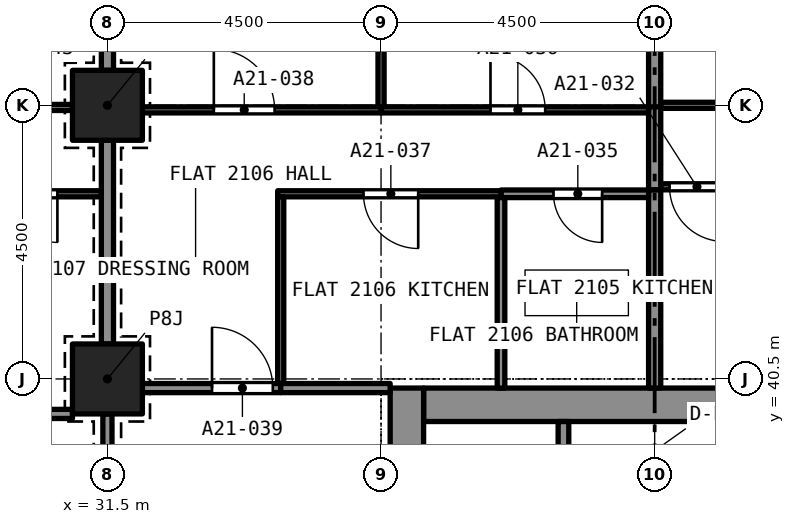
"""IFC4 building model, lengths in metres.
Left out: names, types, materials, properties, quantities, classifications, styles, units other than length and angle.
Written with IfcOpenShell. Run it as: python <this file> out.ifc"""

import sys

from ifc_helpers import new_model, si_unit, direction, frame, frame_2d, origin, origin_2d, place, context, subcontext, project, spatial, rectangle, extrude, element, fill, save


model = new_model("IFC4")
c1 = context("Model", 3, precision=1e-05, world=origin(), true_north=direction((0.0, 1.0)))
c2 = subcontext(c1, "Body", "Model", "MODEL_VIEW")
j1 = project(units=[si_unit("LENGTHUNIT", "METRE"), si_unit("PLANEANGLEUNIT", "RADIAN")], contexts=[c1])
p1 = place(None, origin())
s1 = spatial("IfcSite", under=j1, at=p1, CompositionType="ELEMENT")
p2 = place(p1, origin())
s2 = spatial("IfcBuilding", under=s1, at=p2, CompositionType="ELEMENT")
p3 = place(p2, frame((0.0, 0.0, 80.0)))
s3 = spatial("IfcBuildingStorey", under=s2, at=p3, CompositionType="ELEMENT", Elevation=80.0)
for number, where, z_axis, x_axis in (
    (1, (31.5, 40.5, 0.0), (0.0, 0.0, 1.0), (1.0, 0.0, 0.0)),
    (2, (31.5, 45.0, 0.0), (0.0, 0.0, 1.0), (1.0, 0.0, 0.0)),
):
    element("IfcColumn", number, at=place(p3, frame(where, z_axis=z_axis, x_axis=x_axis)), inside=s3, PredefinedType="COLUMN", context=c2, shape_type="SweptSolid", body=[
        extrude(rectangle(XDim=1.15, YDim=1.15, at=origin_2d()), origin(), (0.0, 0.0, 1.0), 3.2),
    ])
p4 = place(p3, frame((36.7, 40.075, 0.0), z_axis=(0.0, 0.0, 1.0), x_axis=(1.0, 0.0, 0.0)))
e3 = element("IfcWall", 3, at=p4, inside=s3, PredefinedType="SOLIDWALL", context=c2, shape_type="SweptSolid", body=[
    extrude(rectangle(XDim=7.6, YDim=0.55, at=frame_2d((3.8, 0.0))), origin(), (0.0, 0.0, 1.0), 3.2),
])
p5 = place(p3, frame((36.425, 27.15, 0.0), z_axis=(0.0, 0.0, 1.0), x_axis=(0.0, 1.0, 0.0)))
e4 = element("IfcWall", 4, at=p5, inside=s3, PredefinedType="SOLIDWALL", context=c2, shape_type="SweptSolid", body=[
    extrude(rectangle(XDim=13.2, YDim=0.55, at=frame_2d((6.6, 0.0))), origin(), (0.0, 0.0, 1.0), 3.2),
])
p6 = place(p5, frame((8.8, 0.0, 0.0)))
e5 = element("IfcOpeningElement", 5, at=p6, cuts=e4, PredefinedType="OPENING", context=c2, shape_type="SweptSolid", body=[
    extrude(rectangle(XDim=1.2, YDim=2.1, at=frame_2d((0.6, 1.05))), frame((0.0, 0.285, 0.0), z_axis=(0.0, -1.0, 0.0), x_axis=(1.0, 0.0, 0.0)), (0.0, 0.0, 1.0), 0.57),
])
p7 = place(p3, frame((40.6, 45.0, 0.0), z_axis=(0.0, 0.0, 1.0), x_axis=(1.0, 0.0, 0.0)))
e6 = element("IfcWall", 6, at=p7, inside=s3, PredefinedType="PARTITIONING", context=c2, shape_type="SweptSolid", body=[
    extrude(rectangle(XDim=4.4, YDim=0.1, at=frame_2d((2.2, 0.0))), origin(), (0.0, 0.0, 1.0), 2.9),
])
p8 = place(p7, frame((1.7, 0.0, 0.0)))
e7 = element("IfcOpeningElement", 7, at=p8, cuts=e6, PredefinedType="OPENING", context=c2, shape_type="SweptSolid", body=[
    extrude(rectangle(XDim=0.9, YDim=2.1, at=frame_2d((0.45, 1.05))), frame((0.0, 0.06, 0.0), z_axis=(0.0, -1.0, 0.0), x_axis=(1.0, 0.0, 0.0)), (0.0, 0.0, 1.0), 0.12),
])
p9 = place(p3, frame((40.5, 44.95, 0.0), z_axis=(0.0, 0.0, 1.0), x_axis=(0.0, 1.0, 0.0)))
e8 = element("IfcWall", 8, at=p9, inside=s3, PredefinedType="PARTITIONING", context=c2, shape_type="SweptSolid", body=[
    extrude(rectangle(XDim=3.975, YDim=0.2, at=frame_2d((1.988, 0.0))), origin(), (0.0, 0.0, 1.0), 2.9),
])
p10 = place(p3, frame((41.891, 43.66, 0.0), z_axis=(0.0, 0.0, 1.0), x_axis=(-1.0, 0.0, 0.0)))
e9 = element("IfcWall", 9, at=p10, inside=s3, PredefinedType="PARTITIONING", context=c2, shape_type="SweptSolid", body=[
    extrude(rectangle(XDim=1.291, YDim=0.1, at=frame_2d((0.646, 0.0))), origin(), (0.0, 0.0, 1.0), 2.9),
])
p11 = place(p10, frame((0.246, 0.0, 0.0)))
e10 = element("IfcOpeningElement", 10, at=p11, cuts=e9, PredefinedType="OPENING", context=c2, shape_type="SweptSolid", body=[
    extrude(rectangle(XDim=0.9, YDim=2.1, at=frame_2d((0.45, 1.05))), frame((0.0, 0.06, 0.0), z_axis=(0.0, -1.0, 0.0), x_axis=(1.0, 0.0, 0.0)), (0.0, 0.0, 1.0), 0.12),
])
p12 = place(p3, frame((40.5, 43.61, 0.0), z_axis=(0.0, 0.0, 1.0), x_axis=(0.0, 1.0, 0.0)))
e11 = element("IfcWall", 11, at=p12, inside=s3, PredefinedType="PARTITIONING", context=c2, shape_type="SweptSolid", body=[
    extrude(rectangle(XDim=1.365, YDim=0.2, at=frame_2d((0.683, 0.0))), origin(), (0.0, 0.0, 1.0), 2.9),
])
p13 = place(p3, frame((40.5, 40.35, 0.0), z_axis=(0.0, 0.0, 1.0), x_axis=(0.0, 1.0, 0.0)))
e12 = element("IfcWall", 12, at=p13, inside=s3, PredefinedType="PARTITIONING", context=c2, shape_type="SweptSolid", body=[
    extrude(rectangle(XDim=3.257, YDim=0.2, at=frame_2d((1.629, 0.0))), origin(), (0.0, 0.0, 1.0), 2.9),
])
p14 = place(p3, frame((40.4, 43.545, 0.0), z_axis=(0.0, 0.0, 1.0), x_axis=(-1.0, 0.0, 0.0)))
e13 = element("IfcWall", 13, at=p14, inside=s3, PredefinedType="PARTITIONING", context=c2, shape_type="SweptSolid", body=[
    extrude(rectangle(XDim=2.427, YDim=0.125, at=frame_2d((1.214, 0.0))), origin(), (0.0, 0.0, 1.0), 2.9),
])
p15 = place(p14, frame((0.764, 0.0, 0.0)))
e14 = element("IfcOpeningElement", 14, at=p15, cuts=e13, PredefinedType="OPENING", context=c2, shape_type="SweptSolid", body=[
    extrude(rectangle(XDim=0.8, YDim=2.1, at=frame_2d((0.4, 1.05))), frame((0.0, 0.073, 0.0), z_axis=(0.0, -1.0, 0.0), x_axis=(1.0, 0.0, 0.0)), (0.0, 0.0, 1.0), 0.145),
])
p16 = place(p3, frame((37.973, 40.35, 0.0), z_axis=(0.0, 0.0, 1.0), x_axis=(0.0, 1.0, 0.0)))
e15 = element("IfcWall", 15, at=p16, inside=s3, PredefinedType="PARTITIONING", context=c2, shape_type="SweptSolid", body=[
    extrude(rectangle(XDim=3.132, YDim=0.125, at=frame_2d((1.566, 0.0))), origin(), (0.0, 0.0, 1.0), 2.9),
])
p17 = place(p3, frame((36.0, 44.925, 0.0), z_axis=(0.0, 0.0, 1.0), x_axis=(1.0, 0.0, 0.0)))
e16 = element("IfcWall", 16, at=p17, inside=s3, PredefinedType="PARTITIONING", context=c2, shape_type="SweptSolid", body=[
    extrude(rectangle(XDim=4.4, YDim=0.1, at=frame_2d((2.2, 0.0))), origin(), (0.0, 0.0, 1.0), 2.9),
])
p18 = place(p17, frame((1.8, 0.0, 0.0)))
e17 = element("IfcOpeningElement", 17, at=p18, cuts=e16, PredefinedType="OPENING", context=c2, shape_type="SweptSolid", body=[
    extrude(rectangle(XDim=0.9, YDim=2.1, at=frame_2d((0.45, 1.05))), frame((0.0, 0.06, 0.0), z_axis=(0.0, -1.0, 0.0), x_axis=(1.0, 0.0, 0.0)), (0.0, 0.0, 1.0), 0.12),
])
p19 = place(p3, frame((36.0, 44.975, 0.0), z_axis=(0.0, 0.0, 1.0), x_axis=(0.0, 1.0, 0.0)))
e18 = element("IfcWall", 18, at=p19, inside=s3, PredefinedType="PARTITIONING", context=c2, shape_type="SweptSolid", body=[
    extrude(rectangle(XDim=3.95, YDim=0.1, at=frame_2d((1.975, 0.0))), origin(), (0.0, 0.0, 1.0), 2.9),
])
p20 = place(p3, frame((37.973, 43.545, 0.0), z_axis=(0.0, 0.0, 1.0), x_axis=(-1.0, 0.0, 0.0)))
e19 = element("IfcWall", 19, at=p20, inside=s3, PredefinedType="PARTITIONING", context=c2, shape_type="SweptSolid", body=[
    extrude(rectangle(XDim=3.673, YDim=0.1, at=frame_2d((1.836, 0.0))), origin(), (0.0, 0.0, 1.0), 2.9),
])
p21 = place(p20, frame((1.361, 0.0, 0.0)))
e20 = element("IfcOpeningElement", 20, at=p21, cuts=e19, PredefinedType="OPENING", context=c2, shape_type="SweptSolid", body=[
    extrude(rectangle(XDim=0.9, YDim=2.1, at=frame_2d((0.45, 1.05))), frame((0.0, 0.06, 0.0), z_axis=(0.0, -1.0, 0.0), x_axis=(1.0, 0.0, 0.0)), (0.0, 0.0, 1.0), 0.12),
])
p22 = place(p3, frame((34.35, 40.425, 0.0), z_axis=(0.0, 0.0, 1.0), x_axis=(0.0, 1.0, 0.0)))
e21 = element("IfcWall", 21, at=p22, inside=s3, PredefinedType="PARTITIONING", context=c2, shape_type="SweptSolid", body=[
    extrude(rectangle(XDim=3.07, YDim=0.1, at=frame_2d((1.535, 0.0))), origin(), (0.0, 0.0, 1.0), 2.9),
])
p23 = place(p3, frame((32.075, 44.925, 0.0), z_axis=(0.0, 0.0, 1.0), x_axis=(1.0, 0.0, 0.0)))
e22 = element("IfcWall", 22, at=p23, inside=s3, PredefinedType="PARTITIONING", context=c2, shape_type="SweptSolid", body=[
    extrude(rectangle(XDim=3.925, YDim=0.1, at=frame_2d((1.962, 0.0))), origin(), (0.0, 0.0, 1.0), 2.9),
])
p24 = place(p23, frame((1.175, 0.0, 0.0)))
e23 = element("IfcOpeningElement", 23, at=p24, cuts=e22, PredefinedType="OPENING", context=c2, shape_type="SweptSolid", body=[
    extrude(rectangle(XDim=1.0, YDim=2.1, at=frame_2d((0.5, 1.05))), frame((0.0, 0.06, 0.0), z_axis=(0.0, -1.0, 0.0), x_axis=(1.0, 0.0, 0.0)), (0.0, 0.0, 1.0), 0.12),
])
p25 = place(p3, frame((31.5, 41.075, 0.0), z_axis=(0.0, 0.0, 1.0), x_axis=(0.0, 1.0, 0.0)))
e24 = element("IfcWall", 24, at=p25, inside=s3, PredefinedType="PARTITIONING", context=c2, shape_type="SweptSolid", body=[
    extrude(rectangle(XDim=3.35, YDim=0.2, at=frame_2d((1.675, 0.0))), origin(), (0.0, 0.0, 1.0), 2.38),
])
p26 = place(p3, frame((32.075, 40.35, 0.0), z_axis=(0.0, 0.0, 1.0), x_axis=(1.0, 0.0, 0.0)))
e25 = element("IfcWall", 25, at=p26, inside=s3, PredefinedType="PARTITIONING", context=c2, shape_type="SweptSolid", body=[
    extrude(rectangle(XDim=2.275, YDim=0.15, at=frame_2d((1.138, 0.0))), origin(), (0.0, 0.0, 1.0), 2.9),
])
p27 = place(p26, frame((1.145, 0.0, 0.0)))
e26 = element("IfcOpeningElement", 26, at=p27, cuts=e25, PredefinedType="OPENING", context=c2, shape_type="SweptSolid", body=[
    extrude(rectangle(XDim=1.0, YDim=2.1, at=frame_2d((0.5, 1.05))), frame((0.0, 0.085, 0.0), z_axis=(0.0, -1.0, 0.0), x_axis=(1.0, 0.0, 0.0)), (0.0, 0.0, 1.0), 0.17),
])
p28 = place(p3, frame((34.35, 40.35, 0.0), z_axis=(0.0, 0.0, 1.0), x_axis=(1.0, 0.0, 0.0)))
e27 = element("IfcWall", 27, at=p28, inside=s3, PredefinedType="PARTITIONING", context=c2, shape_type="SweptSolid", body=[
    extrude(rectangle(XDim=1.8, YDim=0.15, at=frame_2d((0.9, 0.0))), origin(), (0.0, 0.0, 1.0), 2.9),
])
p29 = place(p3, frame((31.5, 45.575, 0.0), z_axis=(0.0, 0.0, 1.0), x_axis=(0.0, 1.0, 0.0)))
e28 = element("IfcWall", 28, at=p29, inside=s3, PredefinedType="PARTITIONING", context=c2, shape_type="SweptSolid", body=[
    extrude(rectangle(XDim=3.35, YDim=0.2, at=frame_2d((1.675, 0.0))), origin(), (0.0, 0.0, 1.0), 2.38),
])
p30 = place(p3, frame((25.35, 39.925, 0.0), z_axis=(0.0, 0.0, 1.0), x_axis=(1.0, 0.0, 0.0)))
e29 = element("IfcWall", 29, at=p30, inside=s3, PredefinedType="PARTITIONING", context=c2, shape_type="SweptSolid", body=[
    extrude(rectangle(XDim=5.575, YDim=0.15, at=frame_2d((2.788, 0.0))), origin(), (0.0, 0.0, 1.0), 2.75),
])
p31 = place(p3, frame((27.0, 44.965, 0.0), z_axis=(0.0, 0.0, 1.0), x_axis=(1.0, 0.0, 0.0)))
e30 = element("IfcWall", 30, at=p31, inside=s3, PredefinedType="PARTITIONING", context=c2, shape_type="SweptSolid", body=[
    extrude(rectangle(XDim=3.925, YDim=0.1, at=frame_2d((1.962, 0.0))), origin(), (0.0, 0.0, 1.0), 2.75),
])
p32 = place(p31, frame((1.8, 0.0, 0.0)))
e31 = element("IfcOpeningElement", 31, at=p32, cuts=e30, PredefinedType="OPENING", context=c2, shape_type="SweptSolid", body=[
    extrude(rectangle(XDim=0.9, YDim=2.1, at=frame_2d((0.45, 1.05))), frame((0.0, 0.06, 0.0), z_axis=(0.0, -1.0, 0.0), x_axis=(1.0, 0.0, 0.0)), (0.0, 0.0, 1.0), 0.12),
])
p33 = place(p3, frame((31.4, 43.545, 0.0), z_axis=(0.0, 0.0, 1.0), x_axis=(-1.0, 0.0, 0.0)))
e32 = element("IfcWall", 32, at=p33, inside=s3, PredefinedType="PARTITIONING", context=c2, shape_type="SweptSolid", body=[
    extrude(rectangle(XDim=2.345, YDim=0.1, at=frame_2d((1.173, 0.0))), origin(), (0.0, 0.0, 1.0), 2.75),
])
p34 = place(p33, frame((0.723, 0.0, 0.0)))
e33 = element("IfcOpeningElement", 33, at=p34, cuts=e32, PredefinedType="OPENING", context=c2, shape_type="SweptSolid", body=[
    extrude(rectangle(XDim=0.8, YDim=2.1, at=frame_2d((0.4, 1.05))), frame((0.0, 0.06, 0.0), z_axis=(0.0, -1.0, 0.0), x_axis=(1.0, 0.0, 0.0)), (0.0, 0.0, 1.0), 0.12),
])
p35 = place(p3, frame((31.5, 36.575, 0.0), z_axis=(0.0, 0.0, 1.0), x_axis=(0.0, 1.0, 0.0)))
e34 = element("IfcWall", 34, at=p35, inside=s3, PredefinedType="PARTITIONING", context=c2, shape_type="SweptSolid", body=[
    extrude(rectangle(XDim=3.35, YDim=0.15, at=frame_2d((1.675, 0.0))), origin(), (0.0, 0.0, 1.0), 2.38),
])
p36 = place(p35, frame((1.075, 0.0, 0.0)))
e35 = element("IfcOpeningElement", 35, at=p36, cuts=e34, PredefinedType="OPENING", context=c2, shape_type="SweptSolid", body=[
    extrude(rectangle(XDim=1.2, YDim=2.1, at=frame_2d((0.6, 1.05))), frame((0.0, 0.085, 0.0), z_axis=(0.0, -1.0, 0.0), x_axis=(1.0, 0.0, 0.0)), (0.0, 0.0, 1.0), 0.17),
])
p37 = place(p3, frame((39.0, 37.5, 0.0), z_axis=(0.0, 0.0, 1.0), x_axis=(0.0, 1.0, 0.0)))
e36 = element("IfcWall", 36, at=p37, inside=s3, PredefinedType="SOLIDWALL", context=c2, shape_type="SweptSolid", body=[
    extrude(rectangle(XDim=2.3, YDim=0.175, at=frame_2d((1.15, 0.0))), origin(), (0.0, 0.0, 1.0), 2.9),
])
p38 = place(p11, origin())
e37 = element("IfcDoor", 37, at=p38, inside=s3, OperationType="SINGLE_SWING_RIGHT", PredefinedType="DOOR", context=c2, shape_type="SweptSolid", body=[
    extrude(rectangle(XDim=0.9, YDim=2.1, at=frame_2d((0.45, 1.05))), frame((0.0, 0.025, 0.0), z_axis=(0.0, -1.0, 0.0), x_axis=(1.0, 0.0, 0.0)), (0.0, 0.0, 1.0), 0.05),
])
fill(e10, e37)
p39 = place(p15, origin())
e38 = element("IfcDoor", 38, at=p39, inside=s3, OperationType="SINGLE_SWING_LEFT", PredefinedType="DOOR", context=c2, shape_type="SweptSolid", body=[
    extrude(rectangle(XDim=0.8, YDim=2.1, at=frame_2d((0.4, 1.05))), frame((0.0, 0.025, 0.0), z_axis=(0.0, -1.0, 0.0), x_axis=(1.0, 0.0, 0.0)), (0.0, 0.0, 1.0), 0.05),
])
fill(e14, e38)
p40 = place(p18, origin())
e39 = element("IfcDoor", 39, at=p40, inside=s3, OperationType="SINGLE_SWING_RIGHT", PredefinedType="DOOR", context=c2, shape_type="SweptSolid", body=[
    extrude(rectangle(XDim=0.9, YDim=2.1, at=frame_2d((0.45, 1.05))), frame((0.0, 0.025, 0.0), z_axis=(0.0, -1.0, 0.0), x_axis=(1.0, 0.0, 0.0)), (0.0, 0.0, 1.0), 0.05),
])
fill(e17, e39)
p41 = place(p21, origin())
e40 = element("IfcDoor", 40, at=p41, inside=s3, OperationType="SINGLE_SWING_LEFT", PredefinedType="DOOR", context=c2, shape_type="SweptSolid", body=[
    extrude(rectangle(XDim=0.9, YDim=2.1, at=frame_2d((0.45, 1.05))), frame((0.0, 0.025, 0.0), z_axis=(0.0, -1.0, 0.0), x_axis=(1.0, 0.0, 0.0)), (0.0, 0.0, 1.0), 0.05),
])
fill(e20, e40)
p42 = place(p24, origin())
e41 = element("IfcDoor", 41, at=p42, inside=s3, OperationType="SINGLE_SWING_LEFT", PredefinedType="DOOR", context=c2, shape_type="SweptSolid", body=[
    extrude(rectangle(XDim=1.0, YDim=2.1, at=frame_2d((0.5, 1.05))), frame((0.0, 0.025, 0.0), z_axis=(0.0, -1.0, 0.0), x_axis=(1.0, 0.0, 0.0)), (0.0, 0.0, 1.0), 0.05),
])
fill(e23, e41)
p43 = place(p27, origin())
e42 = element("IfcDoor", 42, at=p43, inside=s3, OperationType="SINGLE_SWING_RIGHT", PredefinedType="DOOR", context=c2, shape_type="SweptSolid", body=[
    extrude(rectangle(XDim=1.0, YDim=2.1, at=frame_2d((0.5, 1.05))), frame((0.0, 0.025, 0.0), z_axis=(0.0, -1.0, 0.0), x_axis=(1.0, 0.0, 0.0)), (0.0, 0.0, 1.0), 0.05),
])
fill(e26, e42)
p44 = place(p34, origin())
e43 = element("IfcDoor", 43, at=p44, inside=s3, OperationType="SINGLE_SWING_LEFT", PredefinedType="DOOR", context=c2, shape_type="SweptSolid", body=[
    extrude(rectangle(XDim=0.8, YDim=2.1, at=frame_2d((0.4, 1.05))), frame((0.0, 0.025, 0.0), z_axis=(0.0, -1.0, 0.0), x_axis=(1.0, 0.0, 0.0)), (0.0, 0.0, 1.0), 0.05),
])
fill(e33, e43)
save(model, sys.argv[1])
